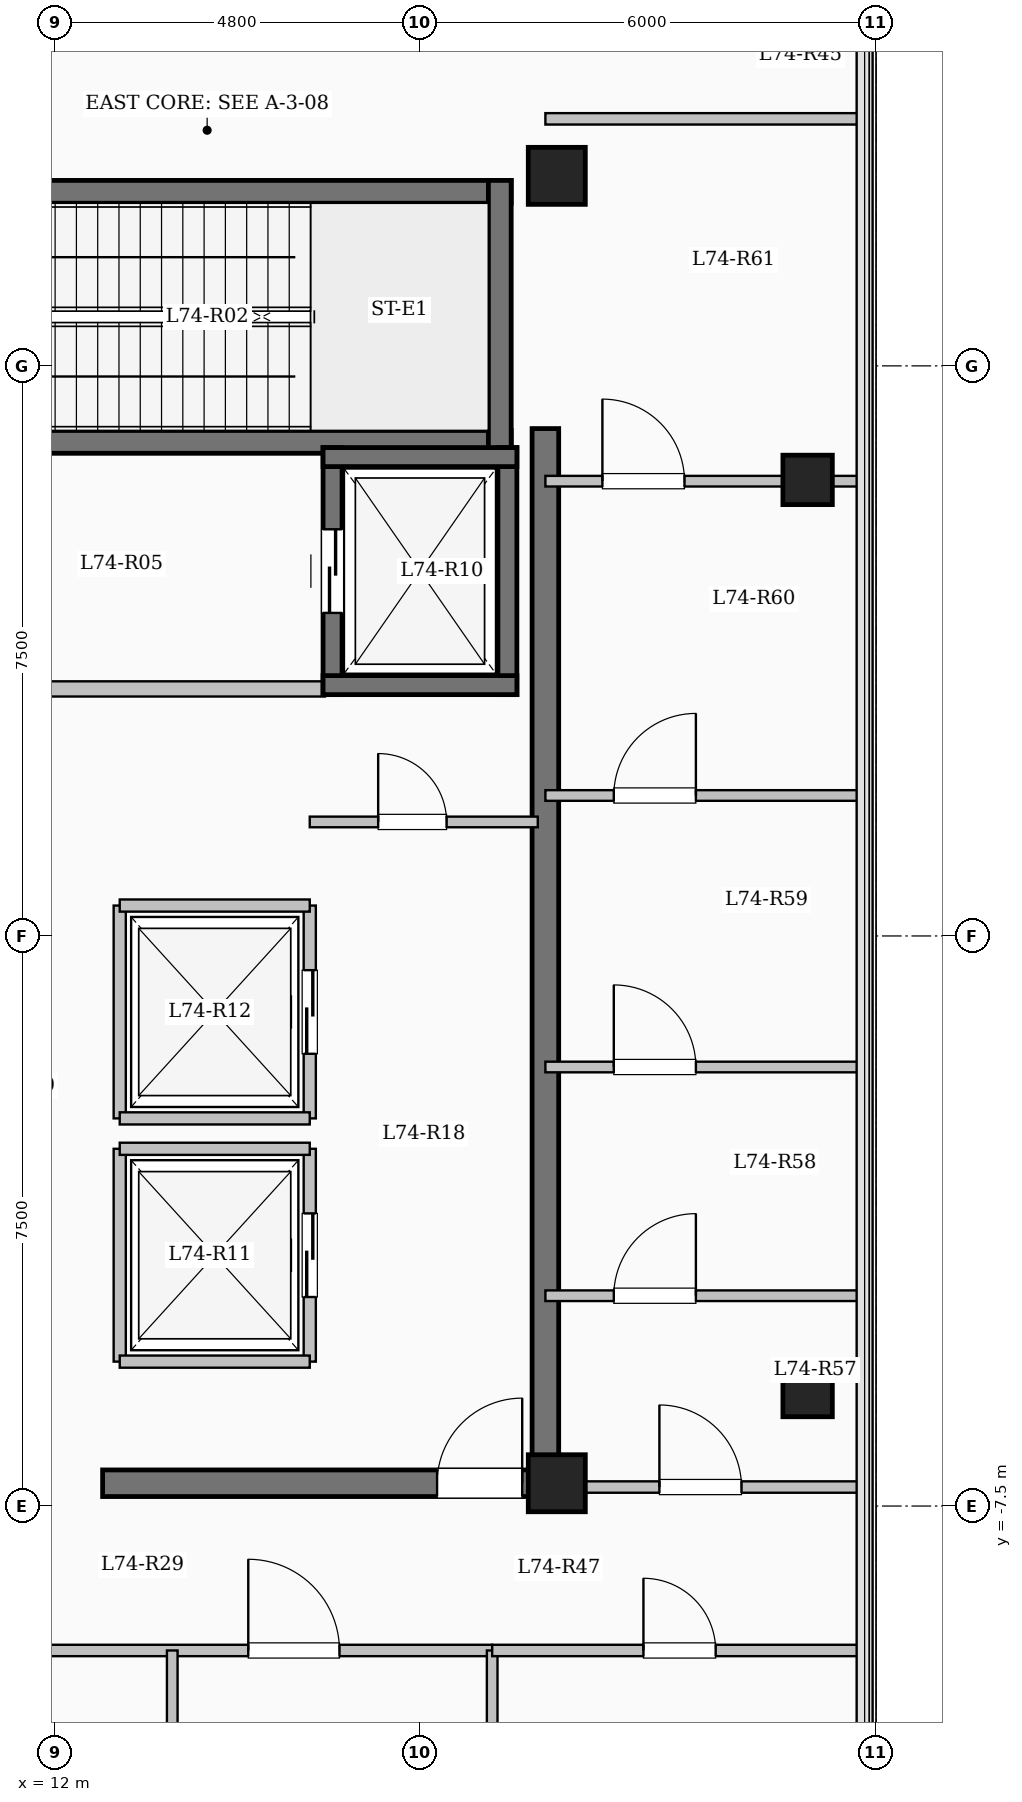
"""IFC4 building model, lengths in metres.
Left out: names, types, materials, properties, quantities, classifications, styles, units other than length and angle.
Written with IfcOpenShell. Run it as: python <this file> out.ifc"""

import sys

from ifc_helpers import new_model, si_unit, direction, frame, frame_2d, origin, origin_2d, place, context, subcontext, project, spatial, rectangle, extrude, element, fill, save


model = new_model("IFC4")
c1 = context("Model", 3, precision=1e-05, world=origin(), true_north=direction((0.0, 1.0)))
c2 = subcontext(c1, "Body", "Model", "MODEL_VIEW")
j1 = project(units=[si_unit("LENGTHUNIT", "METRE"), si_unit("PLANEANGLEUNIT", "RADIAN")], contexts=[c1])
p1 = place(None, origin())
s1 = spatial("IfcSite", under=j1, at=p1, CompositionType="ELEMENT")
p2 = place(p1, origin())
s2 = spatial("IfcBuilding", under=s1, at=p2, CompositionType="ELEMENT")
p3 = place(p2, frame((0.0, 0.0, 271.65)))
s3 = spatial("IfcBuildingStorey", under=s2, at=p3, CompositionType="ELEMENT", Elevation=271.65)
for number, where, z_axis, x_axis in (
    (1, (18.6, -7.2, 0.0), (0.0, 0.0, 1.0), (1.0, 0.0, 0.0)),
    (2, (18.6, 10.0, 0.0), (0.0, 0.0, 1.0), (1.0, 0.0, 0.0)),
):
    element("IfcColumn", number, at=place(p3, frame(where, z_axis=z_axis, x_axis=x_axis)), inside=s3, PredefinedType="COLUMN", context=c2, shape_type="SweptSolid", body=[
        extrude(rectangle(XDim=0.75, YDim=0.75, at=origin_2d()), origin(), (0.0, 0.0, 1.0), 4.65),
    ])
for number, where, z_axis, x_axis in (
    (3, (21.9, -6.0, 0.0), (0.0, 0.0, 1.0), (1.0, 0.0, 0.0)),
    (4, (21.9, 6.0, 0.0), (0.0, 0.0, 1.0), (1.0, 0.0, 0.0)),
):
    element("IfcColumn", number, at=place(p3, frame(where, z_axis=z_axis, x_axis=x_axis)), inside=s3, PredefinedType="COLUMN", context=c2, shape_type="SweptSolid", body=[
        extrude(rectangle(XDim=0.65, YDim=0.65, at=origin_2d()), origin(), (0.0, 0.0, 1.0), 4.65),
    ])
p4 = place(p3, frame((10.0, 9.79, 0.0), z_axis=(0.0, 0.0, 1.0), x_axis=(1.0, 0.0, 0.0)))
e5 = element("IfcWall", 5, at=p4, inside=s3, PredefinedType="SHEAR", context=c2, shape_type="SweptSolid", body=[
    extrude(rectangle(XDim=8.0, YDim=0.3, at=frame_2d((4.0, 0.0))), origin(), (0.0, 0.0, 1.0), 4.65),
])
p5 = place(p3, frame((10.0, 6.5, 0.0), z_axis=(0.0, 0.0, 1.0), x_axis=(1.0, 0.0, 0.0)))
e6 = element("IfcWall", 6, at=p5, inside=s3, PredefinedType="SHEAR", context=c2, shape_type="SweptSolid", body=[
    extrude(rectangle(XDim=8.0, YDim=0.3, at=frame_2d((4.0, 0.0))), origin(), (0.0, 0.0, 1.0), 4.65),
])
p6 = place(p5, frame((0.55, 0.0, 0.0)))
e7 = element("IfcOpeningElement", 7, at=p6, cuts=e6, PredefinedType="OPENING", context=c2, shape_type="SweptSolid", body=[
    extrude(rectangle(XDim=1.0, YDim=2.15, at=frame_2d((0.5, 1.075))), frame((0.0, 0.16, 0.0), z_axis=(0.0, -1.0, 0.0), x_axis=(1.0, 0.0, 0.0)), (0.0, 0.0, 1.0), 0.32),
])
p7 = place(p3, frame((17.85, 6.35, 0.0), z_axis=(0.0, 0.0, 1.0), x_axis=(0.0, 1.0, 0.0)))
e8 = element("IfcWall", 8, at=p7, inside=s3, PredefinedType="SHEAR", context=c2, shape_type="SweptSolid", body=[
    extrude(rectangle(XDim=3.59, YDim=0.3, at=frame_2d((1.795, 0.0))), origin(), (0.0, 0.0, 1.0), 4.65),
])
p8 = place(p3, frame((10.15, 3.25, 0.0), z_axis=(0.0, 0.0, 1.0), x_axis=(1.0, 0.0, 0.0)))
e9 = element("IfcWall", 9, at=p8, inside=s3, PredefinedType="SOLIDWALL", context=c2, shape_type="SweptSolid", body=[
    extrude(rectangle(XDim=5.4, YDim=0.2, at=frame_2d((2.7, 0.0))), origin(), (0.0, 0.0, 1.0), 4.35),
])
p9 = place(p3, frame((15.65, 3.175, 0.0), z_axis=(0.0, 0.0, 1.0), x_axis=(0.0, 1.0, 0.0)))
e10 = element("IfcWall", 10, at=p9, inside=s3, PredefinedType="SHEAR", context=c2, shape_type="SweptSolid", body=[
    extrude(rectangle(XDim=3.25, YDim=0.25, at=frame_2d((1.625, 0.0))), origin(), (0.0, 0.0, 1.0), 4.65),
])
p10 = place(p9, frame((1.075, 0.0, 0.0)))
e11 = element("IfcOpeningElement", 11, at=p10, cuts=e10, PredefinedType="OPENING", context=c2, shape_type="SweptSolid", body=[
    extrude(rectangle(XDim=1.1, YDim=2.15, at=frame_2d((0.55, 1.075))), frame((0.0, 0.135, 0.0), z_axis=(0.0, -1.0, 0.0), x_axis=(1.0, 0.0, 0.0)), (0.0, 0.0, 1.0), 0.27),
])
p11 = place(p3, frame((17.95, 3.175, 0.0), z_axis=(0.0, 0.0, 1.0), x_axis=(0.0, 1.0, 0.0)))
e12 = element("IfcWall", 12, at=p11, inside=s3, PredefinedType="SHEAR", context=c2, shape_type="SweptSolid", body=[
    extrude(rectangle(XDim=3.25, YDim=0.25, at=frame_2d((1.625, 0.0))), origin(), (0.0, 0.0, 1.0), 4.65),
])
for number, where, z_axis, x_axis in (
    (13, (15.525, 3.3, 0.0), (0.0, 0.0, 1.0), (1.0, 0.0, 0.0)),
    (14, (15.525, 6.3, 0.0), (0.0, 0.0, 1.0), (1.0, 0.0, 0.0)),
):
    element("IfcWall", number, at=place(p3, frame(where, z_axis=z_axis, x_axis=x_axis)), inside=s3, PredefinedType="SHEAR", context=c2, shape_type="SweptSolid", body=[
        extrude(rectangle(XDim=2.55, YDim=0.25, at=frame_2d((1.275, 0.0))), origin(), (0.0, 0.0, 1.0), 4.65),
    ])
p12 = place(p3, frame((12.85, -5.6, 0.0), z_axis=(0.0, 0.0, 1.0), x_axis=(0.0, 1.0, 0.0)))
e15 = element("IfcWall", 15, at=p12, inside=s3, PredefinedType="SOLIDWALL", context=c2, shape_type="SweptSolid", body=[
    extrude(rectangle(XDim=2.8, YDim=0.16, at=frame_2d((1.4, 0.0))), origin(), (0.0, 0.0, 1.0), 4.35),
])
p13 = place(p3, frame((15.35, -5.6, 0.0), z_axis=(0.0, 0.0, 1.0), x_axis=(0.0, 1.0, 0.0)))
e16 = element("IfcWall", 16, at=p13, inside=s3, PredefinedType="SOLIDWALL", context=c2, shape_type="SweptSolid", body=[
    extrude(rectangle(XDim=2.8, YDim=0.16, at=frame_2d((1.4, 0.0))), origin(), (0.0, 0.0, 1.0), 4.35),
])
p14 = place(p13, frame((0.85, 0.0, 0.0)))
e17 = element("IfcOpeningElement", 17, at=p14, cuts=e16, PredefinedType="OPENING", context=c2, shape_type="SweptSolid", body=[
    extrude(rectangle(XDim=1.1, YDim=2.15, at=frame_2d((0.55, 1.075))), frame((0.0, 0.09, 0.0), z_axis=(0.0, -1.0, 0.0), x_axis=(1.0, 0.0, 0.0)), (0.0, 0.0, 1.0), 0.18),
])
for number, where, z_axis, x_axis in (
    (18, (12.85, -5.6, 0.0), (0.0, 0.0, 1.0), (1.0, 0.0, 0.0)),
    (19, (12.85, -2.8, 0.0), (0.0, 0.0, 1.0), (1.0, 0.0, 0.0)),
):
    element("IfcWall", number, at=place(p3, frame(where, z_axis=z_axis, x_axis=x_axis)), inside=s3, PredefinedType="SOLIDWALL", context=c2, shape_type="SweptSolid", body=[
        extrude(rectangle(XDim=2.5, YDim=0.16, at=frame_2d((1.25, 0.0))), origin(), (0.0, 0.0, 1.0), 4.35),
    ])
p15 = place(p3, frame((12.85, -2.4, 0.0), z_axis=(0.0, 0.0, 1.0), x_axis=(0.0, 1.0, 0.0)))
e20 = element("IfcWall", 20, at=p15, inside=s3, PredefinedType="SOLIDWALL", context=c2, shape_type="SweptSolid", body=[
    extrude(rectangle(XDim=2.8, YDim=0.16, at=frame_2d((1.4, 0.0))), origin(), (0.0, 0.0, 1.0), 4.35),
])
p16 = place(p3, frame((15.35, -2.4, 0.0), z_axis=(0.0, 0.0, 1.0), x_axis=(0.0, 1.0, 0.0)))
e21 = element("IfcWall", 21, at=p16, inside=s3, PredefinedType="SOLIDWALL", context=c2, shape_type="SweptSolid", body=[
    extrude(rectangle(XDim=2.8, YDim=0.16, at=frame_2d((1.4, 0.0))), origin(), (0.0, 0.0, 1.0), 4.35),
])
p17 = place(p16, frame((0.85, 0.0, 0.0)))
e22 = element("IfcOpeningElement", 22, at=p17, cuts=e21, PredefinedType="OPENING", context=c2, shape_type="SweptSolid", body=[
    extrude(rectangle(XDim=1.1, YDim=2.15, at=frame_2d((0.55, 1.075))), frame((0.0, 0.09, 0.0), z_axis=(0.0, -1.0, 0.0), x_axis=(1.0, 0.0, 0.0)), (0.0, 0.0, 1.0), 0.18),
])
for number, where, z_axis, x_axis in (
    (23, (12.85, -2.4, 0.0), (0.0, 0.0, 1.0), (1.0, 0.0, 0.0)),
    (24, (12.85, 0.4, 0.0), (0.0, 0.0, 1.0), (1.0, 0.0, 0.0)),
):
    element("IfcWall", number, at=place(p3, frame(where, z_axis=z_axis, x_axis=x_axis)), inside=s3, PredefinedType="SOLIDWALL", context=c2, shape_type="SweptSolid", body=[
        extrude(rectangle(XDim=2.5, YDim=0.16, at=frame_2d((1.25, 0.0))), origin(), (0.0, 0.0, 1.0), 4.35),
    ])
p18 = place(p3, frame((18.45, -7.375, 0.0), z_axis=(0.0, 0.0, 1.0), x_axis=(0.0, 1.0, 0.0)))
e25 = element("IfcWall", 25, at=p18, inside=s3, PredefinedType="SHEAR", context=c2, shape_type="SweptSolid", body=[
    extrude(rectangle(XDim=14.05, YDim=0.35, at=frame_2d((7.025, 0.0))), origin(), (0.0, 0.0, 1.0), 4.65),
])
p19 = place(p3, frame((12.625, -7.2, 0.0), z_axis=(0.0, 0.0, 1.0), x_axis=(1.0, 0.0, 0.0)))
e26 = element("IfcWall", 26, at=p19, inside=s3, PredefinedType="SHEAR", context=c2, shape_type="SweptSolid", body=[
    extrude(rectangle(XDim=6.0, YDim=0.35, at=frame_2d((3.0, 0.0))), origin(), (0.0, 0.0, 1.0), 4.65),
])
p20 = place(p19, frame((4.4, 0.0, 0.0)))
e27 = element("IfcOpeningElement", 27, at=p20, cuts=e26, PredefinedType="OPENING", context=c2, shape_type="SweptSolid", body=[
    extrude(rectangle(XDim=1.12, YDim=2.15, at=frame_2d((0.56, 1.075))), frame((0.0, 0.185, 0.0), z_axis=(0.0, -1.0, 0.0), x_axis=(1.0, 0.0, 0.0)), (0.0, 0.0, 1.0), 0.37),
])
p21 = place(p3, frame((15.35, 1.5, 0.0), z_axis=(0.0, 0.0, 1.0), x_axis=(1.0, 0.0, 0.0)))
e28 = element("IfcWall", 28, at=p21, inside=s3, PredefinedType="PARTITIONING", context=c2, shape_type="SweptSolid", body=[
    extrude(rectangle(XDim=3.0, YDim=0.14, at=frame_2d((1.5, 0.0))), origin(), (0.0, 0.0, 1.0), 4.35),
])
p22 = place(p21, frame((0.9, 0.0, 0.0)))
e29 = element("IfcOpeningElement", 29, at=p22, cuts=e28, PredefinedType="OPENING", context=c2, shape_type="SweptSolid", body=[
    extrude(rectangle(XDim=0.9, YDim=2.08, at=frame_2d((0.45, 1.04))), frame((0.0, 0.08, 0.0), z_axis=(0.0, -1.0, 0.0), x_axis=(1.0, 0.0, 0.0)), (0.0, 0.0, 1.0), 0.16),
])
p23 = place(p3, frame((8.55, -9.4, 0.0), z_axis=(0.0, 0.0, 1.0), x_axis=(1.0, 0.0, 0.0)))
e30 = element("IfcWall", 30, at=p23, inside=s3, PredefinedType="PARTITIONING", context=c2, shape_type="SweptSolid", body=[
    extrude(rectangle(XDim=9.2, YDim=0.15, at=frame_2d((4.6, 0.0))), origin(), (0.0, 0.0, 1.0), 4.35),
])
p24 = place(p23, frame((1.1, 0.0, 0.0)))
e31 = element("IfcOpeningElement", 31, at=p24, cuts=e30, PredefinedType="OPENING", context=c2, shape_type="SweptSolid", body=[
    extrude(rectangle(XDim=1.08, YDim=2.15, at=frame_2d((0.54, 1.075))), frame((0.0, 0.085, 0.0), z_axis=(0.0, -1.0, 0.0), x_axis=(1.0, 0.0, 0.0)), (0.0, 0.0, 1.0), 0.17),
])
p25 = place(p23, frame((5.991, 0.0, 0.0)))
e32 = element("IfcOpeningElement", 32, at=p25, cuts=e30, PredefinedType="OPENING", context=c2, shape_type="SweptSolid", body=[
    extrude(rectangle(XDim=1.2, YDim=2.15, at=frame_2d((0.6, 1.075))), frame((0.0, 0.085, 0.0), z_axis=(0.0, -1.0, 0.0), x_axis=(1.0, 0.0, 0.0)), (0.0, 0.0, 1.0), 0.17),
])
p26 = place(p3, frame((13.541, -20.9, 0.0), z_axis=(0.0, 0.0, 1.0), x_axis=(0.0, 1.0, 0.0)))
e33 = element("IfcWall", 33, at=p26, inside=s3, PredefinedType="PARTITIONING", context=c2, shape_type="SweptSolid", body=[
    extrude(rectangle(XDim=11.5, YDim=0.14, at=frame_2d((5.75, 0.0))), origin(), (0.0, 0.0, 1.0), 4.35),
])
p27 = place(p3, frame((18.45, -7.25, 0.0), z_axis=(0.0, 0.0, 1.0), x_axis=(1.0, 0.0, 0.0)))
e34 = element("IfcWall", 34, at=p27, inside=s3, PredefinedType="PARTITIONING", context=c2, shape_type="SweptSolid", body=[
    extrude(rectangle(XDim=4.23, YDim=0.15, at=frame_2d((2.115, 0.0))), origin(), (0.0, 0.0, 1.0), 4.35),
])
p28 = place(p27, frame((1.5, 0.0, 0.0)))
e35 = element("IfcOpeningElement", 35, at=p28, cuts=e34, PredefinedType="OPENING", context=c2, shape_type="SweptSolid", body=[
    extrude(rectangle(XDim=1.08, YDim=2.15, at=frame_2d((0.54, 1.075))), frame((0.0, 0.085, 0.0), z_axis=(0.0, -1.0, 0.0), x_axis=(1.0, 0.0, 0.0)), (0.0, 0.0, 1.0), 0.17),
])
p29 = place(p3, frame((18.45, 10.75, 0.0), z_axis=(0.0, 0.0, 1.0), x_axis=(1.0, 0.0, 0.0)))
e36 = element("IfcWall", 36, at=p29, inside=s3, PredefinedType="PARTITIONING", context=c2, shape_type="SweptSolid", body=[
    extrude(rectangle(XDim=4.23, YDim=0.15, at=frame_2d((2.115, 0.0))), origin(), (0.0, 0.0, 1.0), 4.35),
])
p30 = place(p3, frame((17.75, -17.55, 0.0), z_axis=(0.0, 0.0, 1.0), x_axis=(0.0, 1.0, 0.0)))
e37 = element("IfcWall", 37, at=p30, inside=s3, PredefinedType="PARTITIONING", context=c2, shape_type="SweptSolid", body=[
    extrude(rectangle(XDim=8.15, YDim=0.14, at=frame_2d((4.075, 0.0))), origin(), (0.0, 0.0, 1.0), 4.35),
])
p31 = place(p3, frame((17.75, -9.4, 0.0), z_axis=(0.0, 0.0, 1.0), x_axis=(1.0, 0.0, 0.0)))
e38 = element("IfcWall", 38, at=p31, inside=s3, PredefinedType="PARTITIONING", context=c2, shape_type="SweptSolid", body=[
    extrude(rectangle(XDim=4.93, YDim=0.15, at=frame_2d((2.465, 0.0))), origin(), (0.0, 0.0, 1.0), 4.35),
])
p32 = place(p31, frame((1.99, 0.0, 0.0)))
e39 = element("IfcOpeningElement", 39, at=p32, cuts=e38, PredefinedType="OPENING", context=c2, shape_type="SweptSolid", body=[
    extrude(rectangle(XDim=0.95, YDim=2.15, at=frame_2d((0.475, 1.075))), frame((0.0, 0.085, 0.0), z_axis=(0.0, -1.0, 0.0), x_axis=(1.0, 0.0, 0.0)), (0.0, 0.0, 1.0), 0.17),
])
p33 = place(p3, frame((18.45, -4.733, 0.0), z_axis=(0.0, 0.0, 1.0), x_axis=(1.0, 0.0, 0.0)))
e40 = element("IfcWall", 40, at=p33, inside=s3, PredefinedType="PARTITIONING", context=c2, shape_type="SweptSolid", body=[
    extrude(rectangle(XDim=4.23, YDim=0.14, at=frame_2d((2.115, 0.0))), origin(), (0.0, 0.0, 1.0), 4.35),
])
p34 = place(p33, frame((0.9, 0.0, 0.0)))
e41 = element("IfcOpeningElement", 41, at=p34, cuts=e40, PredefinedType="OPENING", context=c2, shape_type="SweptSolid", body=[
    extrude(rectangle(XDim=1.08, YDim=2.15, at=frame_2d((0.54, 1.075))), frame((0.0, 0.08, 0.0), z_axis=(0.0, -1.0, 0.0), x_axis=(1.0, 0.0, 0.0)), (0.0, 0.0, 1.0), 0.16),
])
p35 = place(p3, frame((18.45, -1.724, 0.0), z_axis=(0.0, 0.0, 1.0), x_axis=(1.0, 0.0, 0.0)))
e42 = element("IfcWall", 42, at=p35, inside=s3, PredefinedType="PARTITIONING", context=c2, shape_type="SweptSolid", body=[
    extrude(rectangle(XDim=4.23, YDim=0.14, at=frame_2d((2.115, 0.0))), origin(), (0.0, 0.0, 1.0), 4.35),
])
p36 = place(p35, frame((0.9, 0.0, 0.0)))
e43 = element("IfcOpeningElement", 43, at=p36, cuts=e42, PredefinedType="OPENING", context=c2, shape_type="SweptSolid", body=[
    extrude(rectangle(XDim=1.08, YDim=2.15, at=frame_2d((0.54, 1.075))), frame((0.0, 0.08, 0.0), z_axis=(0.0, -1.0, 0.0), x_axis=(1.0, 0.0, 0.0)), (0.0, 0.0, 1.0), 0.16),
])
p37 = place(p3, frame((18.45, 1.848, 0.0), z_axis=(0.0, 0.0, 1.0), x_axis=(1.0, 0.0, 0.0)))
e44 = element("IfcWall", 44, at=p37, inside=s3, PredefinedType="PARTITIONING", context=c2, shape_type="SweptSolid", body=[
    extrude(rectangle(XDim=4.23, YDim=0.14, at=frame_2d((2.115, 0.0))), origin(), (0.0, 0.0, 1.0), 4.35),
])
p38 = place(p37, frame((0.9, 0.0, 0.0)))
e45 = element("IfcOpeningElement", 45, at=p38, cuts=e44, PredefinedType="OPENING", context=c2, shape_type="SweptSolid", body=[
    extrude(rectangle(XDim=1.08, YDim=2.15, at=frame_2d((0.54, 1.075))), frame((0.0, 0.08, 0.0), z_axis=(0.0, -1.0, 0.0), x_axis=(1.0, 0.0, 0.0)), (0.0, 0.0, 1.0), 0.16),
])
p39 = place(p3, frame((18.45, 5.983, 0.0), z_axis=(0.0, 0.0, 1.0), x_axis=(1.0, 0.0, 0.0)))
e46 = element("IfcWall", 46, at=p39, inside=s3, PredefinedType="PARTITIONING", context=c2, shape_type="SweptSolid", body=[
    extrude(rectangle(XDim=4.23, YDim=0.14, at=frame_2d((2.115, 0.0))), origin(), (0.0, 0.0, 1.0), 3.935),
])
p40 = place(p39, frame((0.75, 0.0, 0.0)))
e47 = element("IfcOpeningElement", 47, at=p40, cuts=e46, PredefinedType="OPENING", context=c2, shape_type="SweptSolid", body=[
    extrude(rectangle(XDim=1.08, YDim=2.15, at=frame_2d((0.54, 1.075))), frame((0.0, 0.08, 0.0), z_axis=(0.0, -1.0, 0.0), x_axis=(1.0, 0.0, 0.0)), (0.0, 0.0, 1.0), 0.16),
])
p41 = place(p10, origin())
e48 = element("IfcDoor", 48, at=p41, inside=s3, OperationType="SLIDING_TO_LEFT", PredefinedType="DOOR", context=c2, shape_type="SweptSolid", body=[
    extrude(rectangle(XDim=1.1, YDim=2.15, at=frame_2d((0.55, 1.075))), frame((0.0, 0.025, 0.0), z_axis=(0.0, -1.0, 0.0), x_axis=(1.0, 0.0, 0.0)), (0.0, 0.0, 1.0), 0.05),
])
fill(e11, e48)
p42 = place(p14, origin())
e49 = element("IfcDoor", 49, at=p42, inside=s3, OperationType="SLIDING_TO_LEFT", PredefinedType="DOOR", context=c2, shape_type="SweptSolid", body=[
    extrude(rectangle(XDim=1.1, YDim=2.15, at=frame_2d((0.55, 1.075))), frame((0.0, 0.025, 0.0), z_axis=(0.0, -1.0, 0.0), x_axis=(1.0, 0.0, 0.0)), (0.0, 0.0, 1.0), 0.05),
])
fill(e17, e49)
p43 = place(p17, origin())
e50 = element("IfcDoor", 50, at=p43, inside=s3, OperationType="SLIDING_TO_LEFT", PredefinedType="DOOR", context=c2, shape_type="SweptSolid", body=[
    extrude(rectangle(XDim=1.1, YDim=2.15, at=frame_2d((0.55, 1.075))), frame((0.0, 0.025, 0.0), z_axis=(0.0, -1.0, 0.0), x_axis=(1.0, 0.0, 0.0)), (0.0, 0.0, 1.0), 0.05),
])
fill(e22, e50)
p44 = place(p20, origin())
e51 = element("IfcDoor", 51, at=p44, inside=s3, OperationType="SINGLE_SWING_RIGHT", PredefinedType="DOOR", context=c2, shape_type="SweptSolid", body=[
    extrude(rectangle(XDim=1.12, YDim=2.15, at=frame_2d((0.56, 1.075))), frame((0.0, 0.025, 0.0), z_axis=(0.0, -1.0, 0.0), x_axis=(1.0, 0.0, 0.0)), (0.0, 0.0, 1.0), 0.05),
])
fill(e27, e51)
p45 = place(p22, origin())
e52 = element("IfcDoor", 52, at=p45, inside=s3, OperationType="SINGLE_SWING_LEFT", PredefinedType="DOOR", context=c2, shape_type="SweptSolid", body=[
    extrude(rectangle(XDim=0.9, YDim=2.08, at=frame_2d((0.45, 1.04))), frame((0.0, 0.025, 0.0), z_axis=(0.0, -1.0, 0.0), x_axis=(1.0, 0.0, 0.0)), (0.0, 0.0, 1.0), 0.05),
])
fill(e29, e52)
p46 = place(p25, origin())
e53 = element("IfcDoor", 53, at=p46, inside=s3, OperationType="SINGLE_SWING_LEFT", PredefinedType="DOOR", context=c2, shape_type="SweptSolid", body=[
    extrude(rectangle(XDim=1.2, YDim=2.15, at=frame_2d((0.6, 1.075))), frame((0.0, 0.025, 0.0), z_axis=(0.0, -1.0, 0.0), x_axis=(1.0, 0.0, 0.0)), (0.0, 0.0, 1.0), 0.05),
])
fill(e32, e53)
p47 = place(p32, origin())
e54 = element("IfcDoor", 54, at=p47, inside=s3, OperationType="SINGLE_SWING_LEFT", PredefinedType="DOOR", context=c2, shape_type="SweptSolid", body=[
    extrude(rectangle(XDim=0.95, YDim=2.15, at=frame_2d((0.475, 1.075))), frame((0.0, 0.025, 0.0), z_axis=(0.0, -1.0, 0.0), x_axis=(1.0, 0.0, 0.0)), (0.0, 0.0, 1.0), 0.05),
])
fill(e39, e54)
p48 = place(p28, origin())
e55 = element("IfcDoor", 55, at=p48, inside=s3, OperationType="SINGLE_SWING_LEFT", PredefinedType="DOOR", context=c2, shape_type="SweptSolid", body=[
    extrude(rectangle(XDim=1.08, YDim=2.15, at=frame_2d((0.54, 1.075))), frame((0.0, 0.025, 0.0), z_axis=(0.0, -1.0, 0.0), x_axis=(1.0, 0.0, 0.0)), (0.0, 0.0, 1.0), 0.05),
])
fill(e35, e55)
p49 = place(p34, origin())
e56 = element("IfcDoor", 56, at=p49, inside=s3, OperationType="SINGLE_SWING_RIGHT", PredefinedType="DOOR", context=c2, shape_type="SweptSolid", body=[
    extrude(rectangle(XDim=1.08, YDim=2.15, at=frame_2d((0.54, 1.075))), frame((0.0, 0.025, 0.0), z_axis=(0.0, -1.0, 0.0), x_axis=(1.0, 0.0, 0.0)), (0.0, 0.0, 1.0), 0.05),
])
fill(e41, e56)
p50 = place(p36, origin())
e57 = element("IfcDoor", 57, at=p50, inside=s3, OperationType="SINGLE_SWING_LEFT", PredefinedType="DOOR", context=c2, shape_type="SweptSolid", body=[
    extrude(rectangle(XDim=1.08, YDim=2.15, at=frame_2d((0.54, 1.075))), frame((0.0, 0.025, 0.0), z_axis=(0.0, -1.0, 0.0), x_axis=(1.0, 0.0, 0.0)), (0.0, 0.0, 1.0), 0.05),
])
fill(e43, e57)
p51 = place(p38, origin())
e58 = element("IfcDoor", 58, at=p51, inside=s3, OperationType="SINGLE_SWING_RIGHT", PredefinedType="DOOR", context=c2, shape_type="SweptSolid", body=[
    extrude(rectangle(XDim=1.08, YDim=2.15, at=frame_2d((0.54, 1.075))), frame((0.0, 0.025, 0.0), z_axis=(0.0, -1.0, 0.0), x_axis=(1.0, 0.0, 0.0)), (0.0, 0.0, 1.0), 0.05),
])
fill(e45, e58)
p52 = place(p40, origin())
e59 = element("IfcDoor", 59, at=p52, inside=s3, OperationType="SINGLE_SWING_LEFT", PredefinedType="DOOR", context=c2, shape_type="SweptSolid", body=[
    extrude(rectangle(XDim=1.08, YDim=2.15, at=frame_2d((0.54, 1.075))), frame((0.0, 0.025, 0.0), z_axis=(0.0, -1.0, 0.0), x_axis=(1.0, 0.0, 0.0)), (0.0, 0.0, 1.0), 0.05),
])
fill(e47, e59)
save(model, sys.argv[1])
